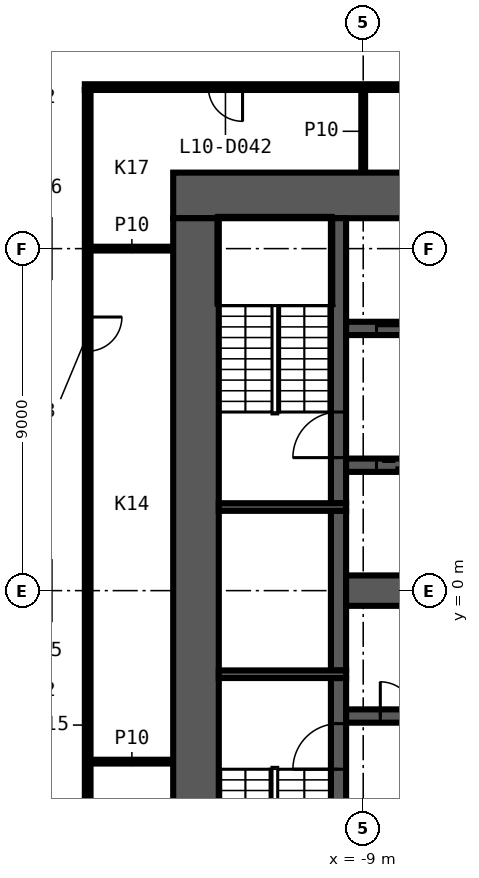
"""IFC4 building model, lengths in metres.
Left out: names, types, materials, properties, quantities, classifications, styles, units other than length and angle.
Written with IfcOpenShell. Run it as: python <this file> out.ifc"""

import sys

from ifc_helpers import new_model, si_unit, direction, frame, frame_2d, origin, place, context, subcontext, project, spatial, rectangle, extrude, element, fill, save


model = new_model("IFC4")
c1 = context("Model", 3, precision=1e-05, world=origin(), true_north=direction((0.0, 1.0)))
c2 = subcontext(c1, "Body", "Model", "MODEL_VIEW")
j1 = project(units=[si_unit("LENGTHUNIT", "METRE"), si_unit("PLANEANGLEUNIT", "RADIAN")], contexts=[c1])
p1 = place(None, origin())
s1 = spatial("IfcSite", under=j1, at=p1, CompositionType="ELEMENT")
p2 = place(p1, origin())
s2 = spatial("IfcBuilding", under=s1, at=p2, CompositionType="ELEMENT")
p3 = place(p2, frame((0.0, 0.0, 58.8)))
s3 = spatial("IfcBuildingStorey", under=s2, at=p3, CompositionType="ELEMENT", Elevation=58.8)
for number, where, z_axis, x_axis in (
    (1, (-16.175, -4.5, 0.0), (0.0, 0.0, 1.0), (1.0, 0.0, 0.0)),
    (2, (-16.175, 9.0, 0.0), (0.0, 0.0, 1.0), (1.0, 0.0, 0.0)),
):
    element("IfcWall", number, at=place(p3, frame(where, z_axis=z_axis, x_axis=x_axis)), inside=s3, PredefinedType="PARTITIONING", context=c2, shape_type="SweptSolid", body=[
        extrude(rectangle(XDim=2.175, YDim=0.1, at=frame_2d((1.087, 0.0))), origin(), (0.0, 0.0, 1.0), 3.3),
    ])
p4 = place(p3, frame((1.425, 13.25, 0.0), z_axis=(0.0, 0.0, 1.0), x_axis=(-1.0, 0.0, 0.0)))
e3 = element("IfcWall", 3, at=p4, inside=s3, PredefinedType="PARTITIONING", context=c2, shape_type="SweptSolid", body=[
    extrude(rectangle(XDim=17.75, YDim=0.15, at=frame_2d((8.875, 0.0))), origin(), (0.0, 0.0, 1.0), 3.3),
])
p5 = place(p4, frame((7.725, 0.0, 0.0)))
e4 = element("IfcOpeningElement", 4, at=p5, cuts=e3, PredefinedType="OPENING", context=c2, shape_type="SweptSolid", body=[
    extrude(rectangle(XDim=0.9, YDim=2.1, at=frame_2d((0.45, 1.05))), frame((0.0, 0.085, 0.0), z_axis=(0.0, -1.0, 0.0), x_axis=(1.0, 0.0, 0.0)), (0.0, 0.0, 1.0), 0.17),
])
p6 = place(p4, frame((13.6, 0.0, 0.0)))
e5 = element("IfcOpeningElement", 5, at=p6, cuts=e3, PredefinedType="OPENING", context=c2, shape_type="SweptSolid", body=[
    extrude(rectangle(XDim=0.9, YDim=2.1, at=frame_2d((0.45, 1.05))), frame((0.0, 0.085, 0.0), z_axis=(0.0, -1.0, 0.0), x_axis=(1.0, 0.0, 0.0)), (0.0, 0.0, 1.0), 0.17),
])
p7 = place(p3, frame((-9.0, 11.0, 0.0), z_axis=(0.0, 0.0, 1.0), x_axis=(0.0, 1.0, 0.0)))
e6 = element("IfcWall", 6, at=p7, inside=s3, PredefinedType="PARTITIONING", context=c2, shape_type="SweptSolid", body=[
    extrude(rectangle(XDim=2.175, YDim=0.1, at=frame_2d((1.087, 0.0))), origin(), (0.0, 0.0, 1.0), 3.3),
])
p8 = place(p3, frame((-16.25, 13.175, 0.0), z_axis=(0.0, 0.0, 1.0), x_axis=(0.0, -1.0, 0.0)))
e7 = element("IfcWall", 7, at=p8, inside=s3, PredefinedType="PARTITIONING", context=c2, shape_type="SweptSolid", body=[
    extrude(rectangle(XDim=26.35, YDim=0.15, at=frame_2d((13.175, 0.0))), origin(), (0.0, 0.0, 1.0), 3.3),
])
p9 = place(p8, frame((5.975, 0.0, 0.0)))
e8 = element("IfcOpeningElement", 8, at=p9, cuts=e7, PredefinedType="OPENING", context=c2, shape_type="SweptSolid", body=[
    extrude(rectangle(XDim=0.9, YDim=2.1, at=frame_2d((0.45, 1.05))), frame((0.0, 0.085, 0.0), z_axis=(0.0, -1.0, 0.0), x_axis=(1.0, 0.0, 0.0)), (0.0, 0.0, 1.0), 0.17),
])
p10 = place(p3, frame((-14.0, 10.4, 0.0), z_axis=(0.0, 0.0, 1.0), x_axis=(1.0, 0.0, 0.0)))
e9 = element("IfcWall", 9, at=p10, inside=s3, PredefinedType="SHEAR", context=c2, shape_type="SweptSolid", body=[
    extrude(rectangle(XDim=28.0, YDim=1.2, at=frame_2d((14.0, 0.0))), origin(), (0.0, 0.0, 1.0), 3.3),
])
p11 = place(p10, frame((15.9, 0.0, 0.0)))
e10 = element("IfcOpeningElement", 10, at=p11, cuts=e9, PredefinedType="OPENING", context=c2, shape_type="SweptSolid", body=[
    extrude(rectangle(XDim=1.6, YDim=2.1, at=frame_2d((0.8, 1.05))), frame((0.0, 0.61, 0.0), z_axis=(0.0, -1.0, 0.0), x_axis=(1.0, 0.0, 0.0)), (0.0, 0.0, 1.0), 1.22),
])
p12 = place(p3, frame((-13.4, -9.8, 0.0), z_axis=(0.0, 0.0, 1.0), x_axis=(0.0, 1.0, 0.0)))
e11 = element("IfcWall", 11, at=p12, inside=s3, PredefinedType="SHEAR", context=c2, shape_type="SweptSolid", body=[
    extrude(rectangle(XDim=19.6, YDim=1.2, at=frame_2d((9.8, 0.0))), origin(), (0.0, 0.0, 1.0), 3.3),
])
p13 = place(p3, frame((-9.65, -9.8, 0.0), z_axis=(0.0, 0.0, 1.0), x_axis=(0.0, 1.0, 0.0)))
e12 = element("IfcWall", 12, at=p13, inside=s3, PredefinedType="SHEAR", context=c2, shape_type="SweptSolid", body=[
    extrude(rectangle(XDim=7.5, YDim=0.4, at=frame_2d((3.75, 0.0))), origin(), (0.0, 0.0, 1.0), 3.3),
])
p14 = place(p13, frame((5.1, 0.0, 0.0)))
e13 = element("IfcOpeningElement", 13, at=p14, cuts=e12, PredefinedType="OPENING", context=c2, shape_type="SweptSolid", body=[
    extrude(rectangle(XDim=1.2, YDim=2.1, at=frame_2d((0.6, 1.05))), frame((0.0, 0.21, 0.0), z_axis=(0.0, -1.0, 0.0), x_axis=(1.0, 0.0, 0.0)), (0.0, 0.0, 1.0), 0.42),
])
p15 = place(p3, frame((-9.65, -2.1, 0.0), z_axis=(0.0, 0.0, 1.0), x_axis=(0.0, 1.0, 0.0)))
e14 = element("IfcWall", 14, at=p15, inside=s3, PredefinedType="SHEAR", context=c2, shape_type="SweptSolid", body=[
    extrude(rectangle(XDim=4.2, YDim=0.4, at=frame_2d((2.1, 0.0))), origin(), (0.0, 0.0, 1.0), 3.3),
])
p16 = place(p3, frame((-9.65, 2.3, 0.0), z_axis=(0.0, 0.0, 1.0), x_axis=(0.0, 1.0, 0.0)))
e15 = element("IfcWall", 15, at=p16, inside=s3, PredefinedType="SHEAR", context=c2, shape_type="SweptSolid", body=[
    extrude(rectangle(XDim=7.5, YDim=0.4, at=frame_2d((3.75, 0.0))), origin(), (0.0, 0.0, 1.0), 3.3),
])
p17 = place(p16, frame((1.2, 0.0, 0.0)))
e16 = element("IfcOpeningElement", 16, at=p17, cuts=e15, PredefinedType="OPENING", context=c2, shape_type="SweptSolid", body=[
    extrude(rectangle(XDim=1.2, YDim=2.1, at=frame_2d((0.6, 1.05))), frame((0.0, 0.21, 0.0), z_axis=(0.0, -1.0, 0.0), x_axis=(1.0, 0.0, 0.0)), (0.0, 0.0, 1.0), 0.42),
])
for number, where, z_axis, x_axis in (
    (17, (-9.45, 2.2, 0.0), (0.0, 0.0, 1.0), (-1.0, 0.0, 0.0)),
    (18, (-9.45, -2.2, 0.0), (0.0, 0.0, 1.0), (-1.0, 0.0, 0.0)),
):
    element("IfcWall", number, at=place(p3, frame(where, z_axis=z_axis, x_axis=x_axis)), inside=s3, PredefinedType="SHEAR", context=c2, shape_type="SweptSolid", body=[
        extrude(rectangle(XDim=3.35, YDim=0.2, at=frame_2d((1.675, 0.0))), origin(), (0.0, 0.0, 1.0), 3.3),
    ])
p18 = place(p3, frame((-9.45, 6.9, 0.0), z_axis=(0.0, 0.0, 1.0), x_axis=(1.0, 0.0, 0.0)))
e19 = element("IfcWall", 19, at=p18, inside=s3, PredefinedType="SHEAR", context=c2, shape_type="SweptSolid", body=[
    extrude(rectangle(XDim=18.9, YDim=0.35, at=frame_2d((9.45, 0.0))), origin(), (0.0, 0.0, 1.0), 3.3),
])
p19 = place(p18, frame((0.8, 0.0, 0.0)))
e20 = element("IfcOpeningElement", 20, at=p19, cuts=e19, PredefinedType="OPENING", context=c2, shape_type="SweptSolid", body=[
    extrude(rectangle(XDim=1.1, YDim=2.1, at=frame_2d((0.55, 1.05))), frame((0.0, 0.185, 0.0), z_axis=(0.0, -1.0, 0.0), x_axis=(1.0, 0.0, 0.0)), (0.0, 0.0, 1.0), 0.37),
])
p20 = place(p18, frame((3.5, 0.0, 0.0)))
e21 = element("IfcOpeningElement", 21, at=p20, cuts=e19, PredefinedType="OPENING", context=c2, shape_type="SweptSolid", body=[
    extrude(rectangle(XDim=1.1, YDim=2.1, at=frame_2d((0.55, 1.05))), frame((0.0, 0.185, 0.0), z_axis=(0.0, -1.0, 0.0), x_axis=(1.0, 0.0, 0.0)), (0.0, 0.0, 1.0), 0.37),
])
p21 = place(p18, frame((6.2, 0.0, 0.0)))
e22 = element("IfcOpeningElement", 22, at=p21, cuts=e19, PredefinedType="OPENING", context=c2, shape_type="SweptSolid", body=[
    extrude(rectangle(XDim=1.1, YDim=2.1, at=frame_2d((0.55, 1.05))), frame((0.0, 0.185, 0.0), z_axis=(0.0, -1.0, 0.0), x_axis=(1.0, 0.0, 0.0)), (0.0, 0.0, 1.0), 0.37),
])
p22 = place(p18, frame((8.9, 0.0, 0.0)))
e23 = element("IfcOpeningElement", 23, at=p22, cuts=e19, PredefinedType="OPENING", context=c2, shape_type="SweptSolid", body=[
    extrude(rectangle(XDim=1.1, YDim=2.1, at=frame_2d((0.55, 1.05))), frame((0.0, 0.185, 0.0), z_axis=(0.0, -1.0, 0.0), x_axis=(1.0, 0.0, 0.0)), (0.0, 0.0, 1.0), 0.37),
])
p23 = place(p18, frame((11.55, 0.0, 0.0)))
e24 = element("IfcOpeningElement", 24, at=p23, cuts=e19, PredefinedType="OPENING", context=c2, shape_type="SweptSolid", body=[
    extrude(rectangle(XDim=1.2, YDim=2.1, at=frame_2d((0.6, 1.05))), frame((0.0, 0.185, 0.0), z_axis=(0.0, -1.0, 0.0), x_axis=(1.0, 0.0, 0.0)), (0.0, 0.0, 1.0), 0.37),
])
p24 = place(p18, frame((14.3, 0.0, 0.0)))
e25 = element("IfcOpeningElement", 25, at=p24, cuts=e19, PredefinedType="OPENING", context=c2, shape_type="SweptSolid", body=[
    extrude(rectangle(XDim=1.1, YDim=2.1, at=frame_2d((0.55, 1.05))), frame((0.0, 0.185, 0.0), z_axis=(0.0, -1.0, 0.0), x_axis=(1.0, 0.0, 0.0)), (0.0, 0.0, 1.0), 0.37),
])
p25 = place(p18, frame((17.0, 0.0, 0.0)))
e26 = element("IfcOpeningElement", 26, at=p25, cuts=e19, PredefinedType="OPENING", context=c2, shape_type="SweptSolid", body=[
    extrude(rectangle(XDim=1.1, YDim=2.1, at=frame_2d((0.55, 1.05))), frame((0.0, 0.185, 0.0), z_axis=(0.0, -1.0, 0.0), x_axis=(1.0, 0.0, 0.0)), (0.0, 0.0, 1.0), 0.37),
])
p26 = place(p3, frame((9.45, 3.3, 0.0), z_axis=(0.0, 0.0, 1.0), x_axis=(-1.0, 0.0, 0.0)))
e27 = element("IfcWall", 27, at=p26, inside=s3, PredefinedType="SHEAR", context=c2, shape_type="SweptSolid", body=[
    extrude(rectangle(XDim=18.9, YDim=0.35, at=frame_2d((9.45, 0.0))), origin(), (0.0, 0.0, 1.0), 3.3),
])
p27 = place(p26, frame((17.0, 0.0, 0.0)))
e28 = element("IfcOpeningElement", 28, at=p27, cuts=e27, PredefinedType="OPENING", context=c2, shape_type="SweptSolid", body=[
    extrude(rectangle(XDim=1.1, YDim=2.1, at=frame_2d((0.55, 1.05))), frame((0.0, 0.185, 0.0), z_axis=(0.0, -1.0, 0.0), x_axis=(1.0, 0.0, 0.0)), (0.0, 0.0, 1.0), 0.37),
])
p28 = place(p26, frame((14.3, 0.0, 0.0)))
e29 = element("IfcOpeningElement", 29, at=p28, cuts=e27, PredefinedType="OPENING", context=c2, shape_type="SweptSolid", body=[
    extrude(rectangle(XDim=1.1, YDim=2.1, at=frame_2d((0.55, 1.05))), frame((0.0, 0.185, 0.0), z_axis=(0.0, -1.0, 0.0), x_axis=(1.0, 0.0, 0.0)), (0.0, 0.0, 1.0), 0.37),
])
p29 = place(p26, frame((11.6, 0.0, 0.0)))
e30 = element("IfcOpeningElement", 30, at=p29, cuts=e27, PredefinedType="OPENING", context=c2, shape_type="SweptSolid", body=[
    extrude(rectangle(XDim=1.1, YDim=2.1, at=frame_2d((0.55, 1.05))), frame((0.0, 0.185, 0.0), z_axis=(0.0, -1.0, 0.0), x_axis=(1.0, 0.0, 0.0)), (0.0, 0.0, 1.0), 0.37),
])
p30 = place(p26, frame((8.9, 0.0, 0.0)))
e31 = element("IfcOpeningElement", 31, at=p30, cuts=e27, PredefinedType="OPENING", context=c2, shape_type="SweptSolid", body=[
    extrude(rectangle(XDim=1.1, YDim=2.1, at=frame_2d((0.55, 1.05))), frame((0.0, 0.185, 0.0), z_axis=(0.0, -1.0, 0.0), x_axis=(1.0, 0.0, 0.0)), (0.0, 0.0, 1.0), 0.37),
])
p31 = place(p26, frame((6.2, 0.0, 0.0)))
e32 = element("IfcOpeningElement", 32, at=p31, cuts=e27, PredefinedType="OPENING", context=c2, shape_type="SweptSolid", body=[
    extrude(rectangle(XDim=1.1, YDim=2.1, at=frame_2d((0.55, 1.05))), frame((0.0, 0.185, 0.0), z_axis=(0.0, -1.0, 0.0), x_axis=(1.0, 0.0, 0.0)), (0.0, 0.0, 1.0), 0.37),
])
p32 = place(p26, frame((3.5, 0.0, 0.0)))
e33 = element("IfcOpeningElement", 33, at=p32, cuts=e27, PredefinedType="OPENING", context=c2, shape_type="SweptSolid", body=[
    extrude(rectangle(XDim=1.1, YDim=2.1, at=frame_2d((0.55, 1.05))), frame((0.0, 0.185, 0.0), z_axis=(0.0, -1.0, 0.0), x_axis=(1.0, 0.0, 0.0)), (0.0, 0.0, 1.0), 0.37),
])
p33 = place(p26, frame((0.9, 0.0, 0.0)))
e34 = element("IfcOpeningElement", 34, at=p33, cuts=e27, PredefinedType="OPENING", context=c2, shape_type="SweptSolid", body=[
    extrude(rectangle(XDim=0.9, YDim=2.1, at=frame_2d((0.45, 1.05))), frame((0.0, 0.185, 0.0), z_axis=(0.0, -1.0, 0.0), x_axis=(1.0, 0.0, 0.0)), (0.0, 0.0, 1.0), 0.37),
])
p34 = place(p3, frame((-9.45, -3.3, 0.0), z_axis=(0.0, 0.0, 1.0), x_axis=(1.0, 0.0, 0.0)))
e35 = element("IfcWall", 35, at=p34, inside=s3, PredefinedType="SHEAR", context=c2, shape_type="SweptSolid", body=[
    extrude(rectangle(XDim=18.9, YDim=0.35, at=frame_2d((9.45, 0.0))), origin(), (0.0, 0.0, 1.0), 3.3),
])
p35 = place(p34, frame((17.0, 0.0, 0.0)))
e36 = element("IfcOpeningElement", 36, at=p35, cuts=e35, PredefinedType="OPENING", context=c2, shape_type="SweptSolid", body=[
    extrude(rectangle(XDim=1.1, YDim=2.1, at=frame_2d((0.55, 1.05))), frame((0.0, 0.185, 0.0), z_axis=(0.0, -1.0, 0.0), x_axis=(1.0, 0.0, 0.0)), (0.0, 0.0, 1.0), 0.37),
])
p36 = place(p34, frame((0.9, 0.0, 0.0)))
e37 = element("IfcOpeningElement", 37, at=p36, cuts=e35, PredefinedType="OPENING", context=c2, shape_type="SweptSolid", body=[
    extrude(rectangle(XDim=0.9, YDim=2.1, at=frame_2d((0.45, 1.05))), frame((0.0, 0.185, 0.0), z_axis=(0.0, -1.0, 0.0), x_axis=(1.0, 0.0, 0.0)), (0.0, 0.0, 1.0), 0.37),
])
p37 = place(p34, frame((6.3, 0.0, 0.0)))
e38 = element("IfcOpeningElement", 38, at=p37, cuts=e35, PredefinedType="OPENING", context=c2, shape_type="SweptSolid", body=[
    extrude(rectangle(XDim=0.9, YDim=2.1, at=frame_2d((0.45, 1.05))), frame((0.0, 0.185, 0.0), z_axis=(0.0, -1.0, 0.0), x_axis=(1.0, 0.0, 0.0)), (0.0, 0.0, 1.0), 0.37),
])
p38 = place(p3, frame((-9.45, 0.0, 0.0), z_axis=(0.0, 0.0, 1.0), x_axis=(1.0, 0.0, 0.0)))
e39 = element("IfcWall", 39, at=p38, inside=s3, PredefinedType="SHEAR", context=c2, shape_type="SweptSolid", body=[
    extrude(rectangle(XDim=18.9, YDim=0.8, at=frame_2d((9.45, 0.0))), origin(), (0.0, 0.0, 1.0), 3.3),
])
p39 = place(p6, origin())
e40 = element("IfcDoor", 40, at=p39, inside=s3, OperationType="SINGLE_SWING_LEFT", PredefinedType="DOOR", context=c2, shape_type="SweptSolid", body=[
    extrude(rectangle(XDim=0.9, YDim=2.1, at=frame_2d((0.45, 1.05))), frame((0.0, 0.025, 0.0), z_axis=(0.0, -1.0, 0.0), x_axis=(1.0, 0.0, 0.0)), (0.0, 0.0, 1.0), 0.05),
])
fill(e5, e40)
p40 = place(p9, origin())
e41 = element("IfcDoor", 41, at=p40, inside=s3, OperationType="SINGLE_SWING_RIGHT", PredefinedType="DOOR", context=c2, shape_type="SweptSolid", body=[
    extrude(rectangle(XDim=0.9, YDim=2.1, at=frame_2d((0.45, 1.05))), frame((0.0, 0.025, 0.0), z_axis=(0.0, -1.0, 0.0), x_axis=(1.0, 0.0, 0.0)), (0.0, 0.0, 1.0), 0.05),
])
fill(e8, e41)
p41 = place(p19, origin())
e42 = element("IfcDoor", 42, at=p41, inside=s3, OperationType="DOUBLE_DOOR_SLIDING", PredefinedType="DOOR", context=c2, shape_type="SweptSolid", body=[
    extrude(rectangle(XDim=1.1, YDim=2.1, at=frame_2d((0.55, 1.05))), frame((0.0, 0.025, 0.0), z_axis=(0.0, -1.0, 0.0), x_axis=(1.0, 0.0, 0.0)), (0.0, 0.0, 1.0), 0.05),
])
fill(e20, e42)
p42 = place(p27, origin())
e43 = element("IfcDoor", 43, at=p42, inside=s3, OperationType="DOUBLE_DOOR_SLIDING", PredefinedType="DOOR", context=c2, shape_type="SweptSolid", body=[
    extrude(rectangle(XDim=1.1, YDim=2.1, at=frame_2d((0.55, 1.05))), frame((0.0, 0.025, 0.0), z_axis=(0.0, -1.0, 0.0), x_axis=(1.0, 0.0, 0.0)), (0.0, 0.0, 1.0), 0.05),
])
fill(e28, e43)
p43 = place(p36, origin())
e44 = element("IfcDoor", 44, at=p43, inside=s3, OperationType="SINGLE_SWING_RIGHT", PredefinedType="DOOR", context=c2, shape_type="SweptSolid", body=[
    extrude(rectangle(XDim=0.9, YDim=2.1, at=frame_2d((0.45, 1.05))), frame((0.0, 0.025, 0.0), z_axis=(0.0, -1.0, 0.0), x_axis=(1.0, 0.0, 0.0)), (0.0, 0.0, 1.0), 0.05),
])
fill(e37, e44)
p44 = place(p17, origin())
e45 = element("IfcDoor", 45, at=p44, inside=s3, OperationType="SINGLE_SWING_RIGHT", PredefinedType="DOOR", context=c2, shape_type="SweptSolid", body=[
    extrude(rectangle(XDim=1.2, YDim=2.1, at=frame_2d((0.6, 1.05))), frame((0.0, 0.025, 0.0), z_axis=(0.0, -1.0, 0.0), x_axis=(1.0, 0.0, 0.0)), (0.0, 0.0, 1.0), 0.05),
])
fill(e16, e45)
p45 = place(p14, origin())
e46 = element("IfcDoor", 46, at=p45, inside=s3, OperationType="SINGLE_SWING_LEFT", PredefinedType="DOOR", context=c2, shape_type="SweptSolid", body=[
    extrude(rectangle(XDim=1.2, YDim=2.1, at=frame_2d((0.6, 1.05))), frame((0.0, 0.025, 0.0), z_axis=(0.0, -1.0, 0.0), x_axis=(1.0, 0.0, 0.0)), (0.0, 0.0, 1.0), 0.05),
])
fill(e13, e46)
save(model, sys.argv[1])
